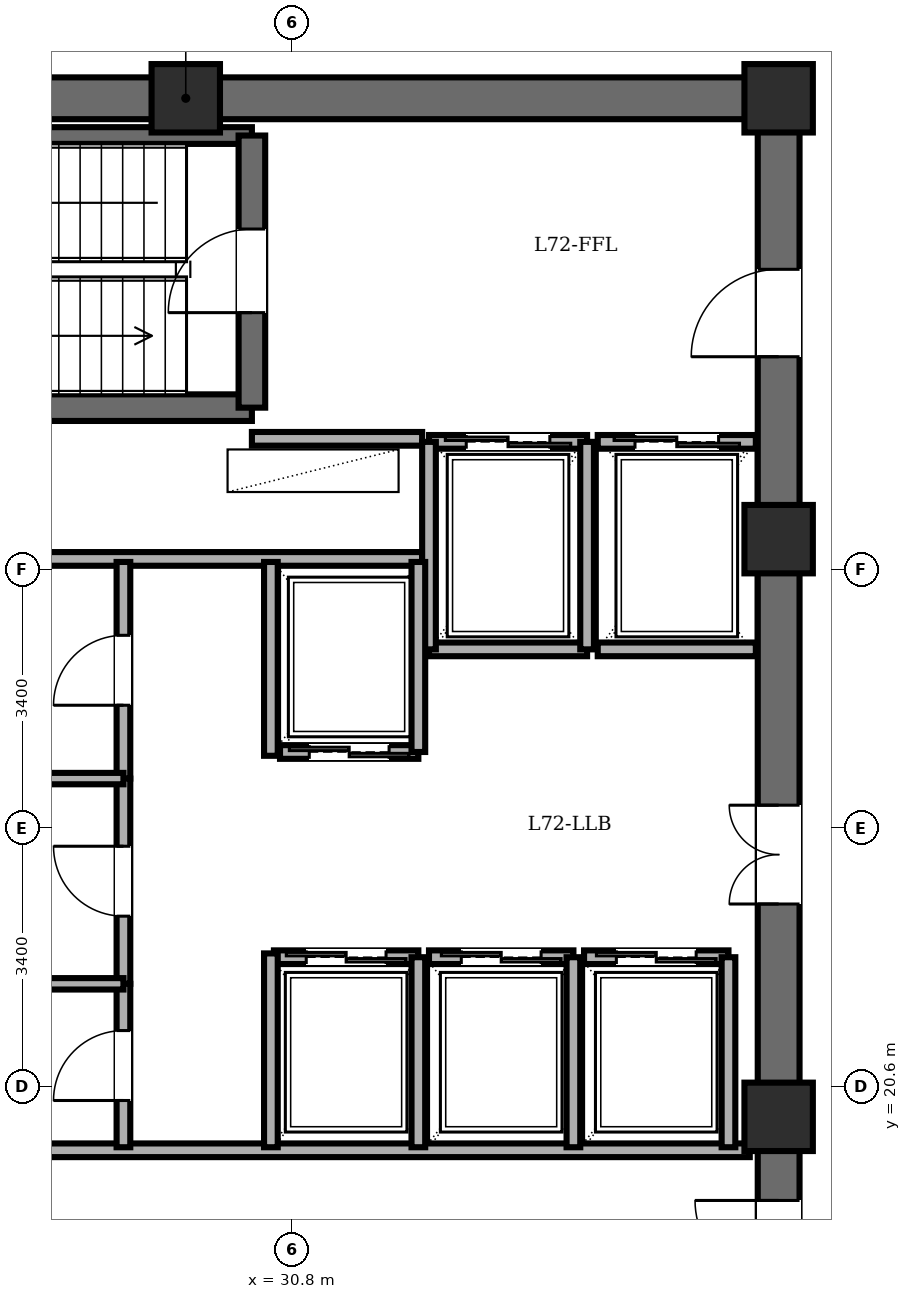
"""IFC4 building model, lengths in metres.
Left out: names, types, materials, properties, quantities, classifications, styles, units other than length and angle.
Written with IfcOpenShell. Run it as: python <this file> out.ifc"""

import sys

from ifc_helpers import new_model, si_unit, direction, frame, frame_2d, origin, origin_2d, place, context, subcontext, project, spatial, rectangle, extrude, element, fill, save


model = new_model("IFC4")
c1 = context("Model", 3, precision=1e-05, world=origin(), true_north=direction((0.0, 1.0)))
c2 = subcontext(c1, "Body", "Model", "MODEL_VIEW")
j1 = project(units=[si_unit("LENGTHUNIT", "METRE"), si_unit("PLANEANGLEUNIT", "RADIAN")], contexts=[c1])
p1 = place(None, origin())
s1 = spatial("IfcSite", under=j1, at=p1, CompositionType="ELEMENT")
p2 = place(p1, origin())
s2 = spatial("IfcBuilding", under=s1, at=p2, CompositionType="ELEMENT")
p3 = place(p2, frame((0.0, 0.0, 277.05)))
s3 = spatial("IfcBuildingStorey", under=s2, at=p3, CompositionType="ELEMENT", Elevation=277.05)
for number, where, z_axis, x_axis in (
    (1, (37.2, 20.2, 0.0), (0.0, 0.0, 1.0), (1.0, 0.0, 0.0)),
    (2, (37.2, 27.8, 0.0), (0.0, 0.0, 1.0), (1.0, 0.0, 0.0)),
    (3, (37.2, 33.6, 0.0), (0.0, 0.0, 1.0), (1.0, 0.0, 0.0)),
    (4, (29.4, 33.6, 0.0), (0.0, 0.0, 1.0), (1.0, 0.0, 0.0)),
):
    element("IfcColumn", number, at=place(p3, frame(where, z_axis=z_axis, x_axis=x_axis)), inside=s3, PredefinedType="COLUMN", context=c2, shape_type="SweptSolid", body=[
        extrude(rectangle(XDim=0.9, YDim=0.9, at=origin_2d()), origin(), (0.0, 0.0, 1.0), 3.65),
    ])
p4 = place(p3, frame((21.6, 33.6, 0.0), z_axis=(0.0, 0.0, 1.0), x_axis=(1.0, 0.0, 0.0)))
e5 = element("IfcWall", 5, at=p4, inside=s3, PredefinedType="SHEAR", context=c2, shape_type="SweptSolid", body=[
    extrude(rectangle(XDim=15.6, YDim=0.55, at=frame_2d((7.8, 0.0))), origin(), (0.0, 0.0, 1.0), 3.45),
])
p5 = place(p3, frame((37.2, 14.4, 0.0), z_axis=(0.0, 0.0, 1.0), x_axis=(0.0, 1.0, 0.0)))
e6 = element("IfcWall", 6, at=p5, inside=s3, PredefinedType="SHEAR", context=c2, shape_type="SweptSolid", body=[
    extrude(rectangle(XDim=19.2, YDim=0.55, at=frame_2d((9.6, 0.0))), origin(), (0.0, 0.0, 1.0), 3.45),
])
p6 = place(p5, frame((15.8, 0.0, 0.0)))
e7 = element("IfcOpeningElement", 7, at=p6, cuts=e6, PredefinedType="OPENING", context=c2, shape_type="SweptSolid", body=[
    extrude(rectangle(XDim=1.15, YDim=2.15, at=frame_2d((0.575, 1.075))), frame((0.0, 0.285, 0.0), z_axis=(0.0, -1.0, 0.0), x_axis=(1.0, 0.0, 0.0)), (0.0, 0.0, 1.0), 0.57),
])
p7 = place(p5, frame((3.6, 0.0, 0.0)))
e8 = element("IfcOpeningElement", 8, at=p7, cuts=e6, PredefinedType="OPENING", context=c2, shape_type="SweptSolid", body=[
    extrude(rectangle(XDim=1.1, YDim=2.15, at=frame_2d((0.55, 1.075))), frame((0.0, 0.285, 0.0), z_axis=(0.0, -1.0, 0.0), x_axis=(1.0, 0.0, 0.0)), (0.0, 0.0, 1.0), 0.57),
])
p8 = place(p5, frame((8.6, 0.0, 0.0)))
e9 = element("IfcOpeningElement", 9, at=p8, cuts=e6, PredefinedType="OPENING", context=c2, shape_type="SweptSolid", body=[
    extrude(rectangle(XDim=1.3, YDim=2.2, at=frame_2d((0.65, 1.1))), frame((0.0, 0.285, 0.0), z_axis=(0.0, -1.0, 0.0), x_axis=(1.0, 0.0, 0.0)), (0.0, 0.0, 1.0), 0.57),
])
p9 = place(p3, frame((22.48, 29.53, 0.0), z_axis=(0.0, 0.0, 1.0), x_axis=(1.0, 0.0, 0.0)))
e10 = element("IfcWall", 10, at=p9, inside=s3, PredefinedType="SOLIDWALL", context=c2, shape_type="SweptSolid", body=[
    extrude(rectangle(XDim=7.79, YDim=0.35, at=frame_2d((3.895, 0.0))), origin(), (0.0, 0.0, 1.0), 3.45),
])
p10 = place(p3, frame((22.48, 33.11, 0.0), z_axis=(0.0, 0.0, 1.0), x_axis=(1.0, 0.0, 0.0)))
e11 = element("IfcWall", 11, at=p10, inside=s3, PredefinedType="PARTITIONING", context=c2, shape_type="SweptSolid", body=[
    extrude(rectangle(XDim=7.79, YDim=0.22, at=frame_2d((3.895, 0.0))), origin(), (0.0, 0.0, 1.0), 3.45),
])
p11 = place(p3, frame((30.27, 29.53, 0.0), z_axis=(0.0, 0.0, 1.0), x_axis=(0.0, 1.0, 0.0)))
e12 = element("IfcWall", 12, at=p11, inside=s3, PredefinedType="SOLIDWALL", context=c2, shape_type="SweptSolid", body=[
    extrude(rectangle(XDim=3.58, YDim=0.35, at=frame_2d((1.79, 0.0))), origin(), (0.0, 0.0, 1.0), 3.45),
])
p12 = place(p11, frame((1.25, 0.0, 0.0)))
e13 = element("IfcOpeningElement", 13, at=p12, cuts=e12, PredefinedType="OPENING", context=c2, shape_type="SweptSolid", body=[
    extrude(rectangle(XDim=1.1, YDim=2.15, at=frame_2d((0.55, 1.075))), frame((0.0, 0.185, 0.0), z_axis=(0.0, -1.0, 0.0), x_axis=(1.0, 0.0, 0.0)), (0.0, 0.0, 1.0), 0.37),
])
p13 = place(p3, frame((30.27, 29.12, 0.0), z_axis=(0.0, 0.0, 1.0), x_axis=(1.0, 0.0, 0.0)))
e14 = element("IfcWall", 14, at=p13, inside=s3, PredefinedType="PARTITIONING", context=c2, shape_type="SweptSolid", body=[
    extrude(rectangle(XDim=2.24, YDim=0.18, at=frame_2d((1.12, 0.0))), origin(), (0.0, 0.0, 1.0), 3.45),
])
p14 = place(p3, frame((21.95, 27.54, 0.0), z_axis=(0.0, 0.0, 1.0), x_axis=(1.0, 0.0, 0.0)))
e15 = element("IfcWall", 15, at=p14, inside=s3, PredefinedType="PARTITIONING", context=c2, shape_type="SweptSolid", body=[
    extrude(rectangle(XDim=10.56, YDim=0.18, at=frame_2d((5.28, 0.0))), origin(), (0.0, 0.0, 1.0), 3.45),
])
p15 = place(p3, frame((21.95, 19.76, 0.0), z_axis=(0.0, 0.0, 1.0), x_axis=(1.0, 0.0, 0.0)))
e16 = element("IfcWall", 16, at=p15, inside=s3, PredefinedType="PARTITIONING", context=c2, shape_type="SweptSolid", body=[
    extrude(rectangle(XDim=14.87, YDim=0.18, at=frame_2d((7.435, 0.0))), origin(), (0.0, 0.0, 1.0), 3.45),
])
p16 = place(p3, frame((32.6, 29.08, 0.0), z_axis=(0.0, 0.0, 1.0), x_axis=(1.0, 0.0, 0.0)))
e17 = element("IfcWall", 17, at=p16, inside=s3, PredefinedType="PARTITIONING", context=c2, shape_type="SweptSolid", body=[
    extrude(rectangle(XDim=2.08, YDim=0.18, at=frame_2d((1.04, 0.0))), origin(), (0.0, 0.0, 1.0), 3.45),
])
p17 = place(p16, frame((0.49, 0.0, 0.0)))
e18 = element("IfcOpeningElement", 18, at=p17, cuts=e17, PredefinedType="OPENING", context=c2, shape_type="SweptSolid", body=[
    extrude(rectangle(XDim=1.1, YDim=2.2, at=frame_2d((0.55, 1.1))), frame((0.0, 0.1, 0.0), z_axis=(0.0, -1.0, 0.0), x_axis=(1.0, 0.0, 0.0)), (0.0, 0.0, 1.0), 0.2),
])
p18 = place(p3, frame((34.68, 26.35, 0.0), z_axis=(0.0, 0.0, 1.0), x_axis=(-1.0, 0.0, 0.0)))
e19 = element("IfcWall", 19, at=p18, inside=s3, PredefinedType="PARTITIONING", context=c2, shape_type="SweptSolid", body=[
    extrude(rectangle(XDim=2.08, YDim=0.18, at=frame_2d((1.04, 0.0))), origin(), (0.0, 0.0, 1.0), 3.45),
])
for number, where, z_axis, x_axis in (
    (20, (34.68, 26.35, 0.0), (0.0, 0.0, 1.0), (0.0, 1.0, 0.0)),
    (21, (32.6, 29.08, 0.0), (0.0, 0.0, 1.0), (0.0, -1.0, 0.0)),
):
    element("IfcWall", number, at=place(p3, frame(where, z_axis=z_axis, x_axis=x_axis)), inside=s3, PredefinedType="PARTITIONING", context=c2, shape_type="SweptSolid", body=[
        extrude(rectangle(XDim=2.73, YDim=0.18, at=frame_2d((1.365, 0.0))), origin(), (0.0, 0.0, 1.0), 3.45),
    ])
p19 = place(p3, frame((34.82, 29.08, 0.0), z_axis=(0.0, 0.0, 1.0), x_axis=(1.0, 0.0, 0.0)))
e22 = element("IfcWall", 22, at=p19, inside=s3, PredefinedType="PARTITIONING", context=c2, shape_type="SweptSolid", body=[
    extrude(rectangle(XDim=2.08, YDim=0.18, at=frame_2d((1.04, 0.0))), origin(), (0.0, 0.0, 1.0), 3.45),
])
p20 = place(p19, frame((0.49, 0.0, 0.0)))
e23 = element("IfcOpeningElement", 23, at=p20, cuts=e22, PredefinedType="OPENING", context=c2, shape_type="SweptSolid", body=[
    extrude(rectangle(XDim=1.1, YDim=2.2, at=frame_2d((0.55, 1.1))), frame((0.0, 0.1, 0.0), z_axis=(0.0, -1.0, 0.0), x_axis=(1.0, 0.0, 0.0)), (0.0, 0.0, 1.0), 0.2),
])
p21 = place(p3, frame((36.9, 26.35, 0.0), z_axis=(0.0, 0.0, 1.0), x_axis=(-1.0, 0.0, 0.0)))
e24 = element("IfcWall", 24, at=p21, inside=s3, PredefinedType="PARTITIONING", context=c2, shape_type="SweptSolid", body=[
    extrude(rectangle(XDim=2.08, YDim=0.18, at=frame_2d((1.04, 0.0))), origin(), (0.0, 0.0, 1.0), 3.45),
])
p22 = place(p3, frame((32.46, 25.0, 0.0), z_axis=(0.0, 0.0, 1.0), x_axis=(-1.0, 0.0, 0.0)))
e25 = element("IfcWall", 25, at=p22, inside=s3, PredefinedType="PARTITIONING", context=c2, shape_type="SweptSolid", body=[
    extrude(rectangle(XDim=1.82, YDim=0.18, at=frame_2d((0.91, 0.0))), origin(), (0.0, 0.0, 1.0), 3.45),
])
p23 = place(p22, frame((0.385, 0.0, 0.0)))
e26 = element("IfcOpeningElement", 26, at=p23, cuts=e25, PredefinedType="OPENING", context=c2, shape_type="SweptSolid", body=[
    extrude(rectangle(XDim=1.05, YDim=2.2, at=frame_2d((0.525, 1.1))), frame((0.0, 0.1, 0.0), z_axis=(0.0, -1.0, 0.0), x_axis=(1.0, 0.0, 0.0)), (0.0, 0.0, 1.0), 0.2),
])
p24 = place(p3, frame((32.46, 25.0, 0.0), z_axis=(0.0, 0.0, 1.0), x_axis=(0.0, 1.0, 0.0)))
e27 = element("IfcWall", 27, at=p24, inside=s3, PredefinedType="PARTITIONING", context=c2, shape_type="SweptSolid", body=[
    extrude(rectangle(XDim=2.5, YDim=0.18, at=frame_2d((1.25, 0.0))), origin(), (0.0, 0.0, 1.0), 3.45),
])
p25 = place(p3, frame((30.56, 22.3, 0.0), z_axis=(0.0, 0.0, 1.0), x_axis=(1.0, 0.0, 0.0)))
e28 = element("IfcWall", 28, at=p25, inside=s3, PredefinedType="PARTITIONING", context=c2, shape_type="SweptSolid", body=[
    extrude(rectangle(XDim=1.9, YDim=0.18, at=frame_2d((0.95, 0.0))), origin(), (0.0, 0.0, 1.0), 3.45),
])
p26 = place(p25, frame((0.425, 0.0, 0.0)))
e29 = element("IfcOpeningElement", 29, at=p26, cuts=e28, PredefinedType="OPENING", context=c2, shape_type="SweptSolid", body=[
    extrude(rectangle(XDim=1.05, YDim=2.2, at=frame_2d((0.525, 1.1))), frame((0.0, 0.1, 0.0), z_axis=(0.0, -1.0, 0.0), x_axis=(1.0, 0.0, 0.0)), (0.0, 0.0, 1.0), 0.2),
])
p27 = place(p3, frame((32.46, 19.8, 0.0), z_axis=(0.0, 0.0, 1.0), x_axis=(0.0, 1.0, 0.0)))
e30 = element("IfcWall", 30, at=p27, inside=s3, PredefinedType="PARTITIONING", context=c2, shape_type="SweptSolid", body=[
    extrude(rectangle(XDim=2.5, YDim=0.18, at=frame_2d((1.25, 0.0))), origin(), (0.0, 0.0, 1.0), 3.45),
])
p28 = place(p3, frame((32.6, 22.3, 0.0), z_axis=(0.0, 0.0, 1.0), x_axis=(1.0, 0.0, 0.0)))
e31 = element("IfcWall", 31, at=p28, inside=s3, PredefinedType="PARTITIONING", context=c2, shape_type="SweptSolid", body=[
    extrude(rectangle(XDim=1.9, YDim=0.18, at=frame_2d((0.95, 0.0))), origin(), (0.0, 0.0, 1.0), 3.45),
])
p29 = place(p28, frame((0.425, 0.0, 0.0)))
e32 = element("IfcOpeningElement", 32, at=p29, cuts=e31, PredefinedType="OPENING", context=c2, shape_type="SweptSolid", body=[
    extrude(rectangle(XDim=1.05, YDim=2.2, at=frame_2d((0.525, 1.1))), frame((0.0, 0.1, 0.0), z_axis=(0.0, -1.0, 0.0), x_axis=(1.0, 0.0, 0.0)), (0.0, 0.0, 1.0), 0.2),
])
p30 = place(p3, frame((34.5, 19.8, 0.0), z_axis=(0.0, 0.0, 1.0), x_axis=(0.0, 1.0, 0.0)))
e33 = element("IfcWall", 33, at=p30, inside=s3, PredefinedType="PARTITIONING", context=c2, shape_type="SweptSolid", body=[
    extrude(rectangle(XDim=2.5, YDim=0.18, at=frame_2d((1.25, 0.0))), origin(), (0.0, 0.0, 1.0), 3.45),
])
p31 = place(p3, frame((34.64, 22.3, 0.0), z_axis=(0.0, 0.0, 1.0), x_axis=(1.0, 0.0, 0.0)))
e34 = element("IfcWall", 34, at=p31, inside=s3, PredefinedType="PARTITIONING", context=c2, shape_type="SweptSolid", body=[
    extrude(rectangle(XDim=1.9, YDim=0.18, at=frame_2d((0.95, 0.0))), origin(), (0.0, 0.0, 1.0), 3.45),
])
p32 = place(p31, frame((0.425, 0.0, 0.0)))
e35 = element("IfcOpeningElement", 35, at=p32, cuts=e34, PredefinedType="OPENING", context=c2, shape_type="SweptSolid", body=[
    extrude(rectangle(XDim=1.05, YDim=2.2, at=frame_2d((0.525, 1.1))), frame((0.0, 0.1, 0.0), z_axis=(0.0, -1.0, 0.0), x_axis=(1.0, 0.0, 0.0)), (0.0, 0.0, 1.0), 0.2),
])
p33 = place(p3, frame((36.54, 19.8, 0.0), z_axis=(0.0, 0.0, 1.0), x_axis=(0.0, 1.0, 0.0)))
e36 = element("IfcWall", 36, at=p33, inside=s3, PredefinedType="PARTITIONING", context=c2, shape_type="SweptSolid", body=[
    extrude(rectangle(XDim=2.5, YDim=0.18, at=frame_2d((1.25, 0.0))), origin(), (0.0, 0.0, 1.0), 3.45),
])
for number, where, z_axis, x_axis in (
    (37, (30.52, 24.95, 0.0), (0.0, 0.0, 1.0), (0.0, 1.0, 0.0)),
    (38, (30.52, 19.8, 0.0), (0.0, 0.0, 1.0), (0.0, 1.0, 0.0)),
):
    element("IfcWall", number, at=place(p3, frame(where, z_axis=z_axis, x_axis=x_axis)), inside=s3, PredefinedType="PARTITIONING", context=c2, shape_type="SweptSolid", body=[
        extrude(rectangle(XDim=2.55, YDim=0.18, at=frame_2d((1.275, 0.0))), origin(), (0.0, 0.0, 1.0), 3.45),
    ])
p34 = place(p3, frame((28.58, 24.65, 0.0), z_axis=(0.0, 0.0, 1.0), x_axis=(0.0, 1.0, 0.0)))
e39 = element("IfcWall", 39, at=p34, inside=s3, PredefinedType="PARTITIONING", context=c2, shape_type="SweptSolid", body=[
    extrude(rectangle(XDim=2.85, YDim=0.18, at=frame_2d((1.425, 0.0))), origin(), (0.0, 0.0, 1.0), 3.45),
])
p35 = place(p34, frame((0.965, 0.0, 0.0)))
e40 = element("IfcOpeningElement", 40, at=p35, cuts=e39, PredefinedType="OPENING", context=c2, shape_type="SweptSolid", body=[
    extrude(rectangle(XDim=0.92, YDim=2.1, at=frame_2d((0.46, 1.05))), frame((0.0, 0.1, 0.0), z_axis=(0.0, -1.0, 0.0), x_axis=(1.0, 0.0, 0.0)), (0.0, 0.0, 1.0), 0.2),
])
p36 = place(p3, frame((28.58, 21.95, 0.0), z_axis=(0.0, 0.0, 1.0), x_axis=(0.0, 1.0, 0.0)))
e41 = element("IfcWall", 41, at=p36, inside=s3, PredefinedType="PARTITIONING", context=c2, shape_type="SweptSolid", body=[
    extrude(rectangle(XDim=2.7, YDim=0.18, at=frame_2d((1.35, 0.0))), origin(), (0.0, 0.0, 1.0), 3.45),
])
p37 = place(p36, frame((0.89, 0.0, 0.0)))
e42 = element("IfcOpeningElement", 42, at=p37, cuts=e41, PredefinedType="OPENING", context=c2, shape_type="SweptSolid", body=[
    extrude(rectangle(XDim=0.92, YDim=2.1, at=frame_2d((0.46, 1.05))), frame((0.0, 0.1, 0.0), z_axis=(0.0, -1.0, 0.0), x_axis=(1.0, 0.0, 0.0)), (0.0, 0.0, 1.0), 0.2),
])
p38 = place(p3, frame((28.58, 19.8, 0.0), z_axis=(0.0, 0.0, 1.0), x_axis=(0.0, 1.0, 0.0)))
e43 = element("IfcWall", 43, at=p38, inside=s3, PredefinedType="PARTITIONING", context=c2, shape_type="SweptSolid", body=[
    extrude(rectangle(XDim=2.15, YDim=0.18, at=frame_2d((1.075, 0.0))), origin(), (0.0, 0.0, 1.0), 3.45),
])
p39 = place(p38, frame((0.615, 0.0, 0.0)))
e44 = element("IfcOpeningElement", 44, at=p39, cuts=e43, PredefinedType="OPENING", context=c2, shape_type="SweptSolid", body=[
    extrude(rectangle(XDim=0.92, YDim=2.1, at=frame_2d((0.46, 1.05))), frame((0.0, 0.1, 0.0), z_axis=(0.0, -1.0, 0.0), x_axis=(1.0, 0.0, 0.0)), (0.0, 0.0, 1.0), 0.2),
])
for number, where, z_axis, x_axis in (
    (45, (21.95, 24.65, 0.0), (0.0, 0.0, 1.0), (1.0, 0.0, 0.0)),
    (46, (21.95, 21.95, 0.0), (0.0, 0.0, 1.0), (1.0, 0.0, 0.0)),
):
    element("IfcWall", number, at=place(p3, frame(where, z_axis=z_axis, x_axis=x_axis)), inside=s3, PredefinedType="PARTITIONING", context=c2, shape_type="SweptSolid", body=[
        extrude(rectangle(XDim=6.63, YDim=0.15, at=frame_2d((3.315, 0.0))), origin(), (0.0, 0.0, 1.0), 3.45),
    ])
p40 = place(p12, origin())
e47 = element("IfcDoor", 47, at=p40, inside=s3, OperationType="SINGLE_SWING_LEFT", PredefinedType="DOOR", context=c2, shape_type="SweptSolid", body=[
    extrude(rectangle(XDim=1.1, YDim=2.15, at=frame_2d((0.55, 1.075))), frame((0.0, 0.025, 0.0), z_axis=(0.0, -1.0, 0.0), x_axis=(1.0, 0.0, 0.0)), (0.0, 0.0, 1.0), 0.05),
])
fill(e13, e47)
p41 = place(p6, origin())
e48 = element("IfcDoor", 48, at=p41, inside=s3, OperationType="SINGLE_SWING_LEFT", PredefinedType="DOOR", context=c2, shape_type="SweptSolid", body=[
    extrude(rectangle(XDim=1.15, YDim=2.15, at=frame_2d((0.575, 1.075))), frame((0.0, 0.025, 0.0), z_axis=(0.0, -1.0, 0.0), x_axis=(1.0, 0.0, 0.0)), (0.0, 0.0, 1.0), 0.05),
])
fill(e7, e48)
p42 = place(p7, origin())
e49 = element("IfcDoor", 49, at=p42, inside=s3, OperationType="SINGLE_SWING_RIGHT", PredefinedType="DOOR", context=c2, shape_type="SweptSolid", body=[
    extrude(rectangle(XDim=1.1, YDim=2.15, at=frame_2d((0.55, 1.075))), frame((0.0, 0.025, 0.0), z_axis=(0.0, -1.0, 0.0), x_axis=(1.0, 0.0, 0.0)), (0.0, 0.0, 1.0), 0.05),
])
fill(e8, e49)
p43 = place(p17, origin())
e50 = element("IfcDoor", 50, at=p43, inside=s3, OperationType="DOUBLE_DOOR_SLIDING", PredefinedType="DOOR", context=c2, shape_type="SweptSolid", body=[
    extrude(rectangle(XDim=1.1, YDim=2.2, at=frame_2d((0.55, 1.1))), frame((0.0, 0.025, 0.0), z_axis=(0.0, -1.0, 0.0), x_axis=(1.0, 0.0, 0.0)), (0.0, 0.0, 1.0), 0.05),
])
fill(e18, e50)
p44 = place(p20, origin())
e51 = element("IfcDoor", 51, at=p44, inside=s3, OperationType="DOUBLE_DOOR_SLIDING", PredefinedType="DOOR", context=c2, shape_type="SweptSolid", body=[
    extrude(rectangle(XDim=1.1, YDim=2.2, at=frame_2d((0.55, 1.1))), frame((0.0, 0.025, 0.0), z_axis=(0.0, -1.0, 0.0), x_axis=(1.0, 0.0, 0.0)), (0.0, 0.0, 1.0), 0.05),
])
fill(e23, e51)
p45 = place(p23, origin())
e52 = element("IfcDoor", 52, at=p45, inside=s3, OperationType="DOUBLE_DOOR_SLIDING", PredefinedType="DOOR", context=c2, shape_type="SweptSolid", body=[
    extrude(rectangle(XDim=1.05, YDim=2.2, at=frame_2d((0.525, 1.1))), frame((0.0, 0.025, 0.0), z_axis=(0.0, -1.0, 0.0), x_axis=(1.0, 0.0, 0.0)), (0.0, 0.0, 1.0), 0.05),
])
fill(e26, e52)
p46 = place(p26, origin())
e53 = element("IfcDoor", 53, at=p46, inside=s3, OperationType="DOUBLE_DOOR_SLIDING", PredefinedType="DOOR", context=c2, shape_type="SweptSolid", body=[
    extrude(rectangle(XDim=1.05, YDim=2.2, at=frame_2d((0.525, 1.1))), frame((0.0, 0.025, 0.0), z_axis=(0.0, -1.0, 0.0), x_axis=(1.0, 0.0, 0.0)), (0.0, 0.0, 1.0), 0.05),
])
fill(e29, e53)
p47 = place(p29, origin())
e54 = element("IfcDoor", 54, at=p47, inside=s3, OperationType="DOUBLE_DOOR_SLIDING", PredefinedType="DOOR", context=c2, shape_type="SweptSolid", body=[
    extrude(rectangle(XDim=1.05, YDim=2.2, at=frame_2d((0.525, 1.1))), frame((0.0, 0.025, 0.0), z_axis=(0.0, -1.0, 0.0), x_axis=(1.0, 0.0, 0.0)), (0.0, 0.0, 1.0), 0.05),
])
fill(e32, e54)
p48 = place(p32, origin())
e55 = element("IfcDoor", 55, at=p48, inside=s3, OperationType="DOUBLE_DOOR_SLIDING", PredefinedType="DOOR", context=c2, shape_type="SweptSolid", body=[
    extrude(rectangle(XDim=1.05, YDim=2.2, at=frame_2d((0.525, 1.1))), frame((0.0, 0.025, 0.0), z_axis=(0.0, -1.0, 0.0), x_axis=(1.0, 0.0, 0.0)), (0.0, 0.0, 1.0), 0.05),
])
fill(e35, e55)
p49 = place(p35, origin())
e56 = element("IfcDoor", 56, at=p49, inside=s3, OperationType="SINGLE_SWING_LEFT", PredefinedType="DOOR", context=c2, shape_type="SweptSolid", body=[
    extrude(rectangle(XDim=0.92, YDim=2.1, at=frame_2d((0.46, 1.05))), frame((0.0, 0.025, 0.0), z_axis=(0.0, -1.0, 0.0), x_axis=(1.0, 0.0, 0.0)), (0.0, 0.0, 1.0), 0.05),
])
fill(e40, e56)
p50 = place(p37, origin())
e57 = element("IfcDoor", 57, at=p50, inside=s3, OperationType="SINGLE_SWING_RIGHT", PredefinedType="DOOR", context=c2, shape_type="SweptSolid", body=[
    extrude(rectangle(XDim=0.92, YDim=2.1, at=frame_2d((0.46, 1.05))), frame((0.0, 0.025, 0.0), z_axis=(0.0, -1.0, 0.0), x_axis=(1.0, 0.0, 0.0)), (0.0, 0.0, 1.0), 0.05),
])
fill(e42, e57)
p51 = place(p39, origin())
e58 = element("IfcDoor", 58, at=p51, inside=s3, OperationType="SINGLE_SWING_LEFT", PredefinedType="DOOR", context=c2, shape_type="SweptSolid", body=[
    extrude(rectangle(XDim=0.92, YDim=2.1, at=frame_2d((0.46, 1.05))), frame((0.0, 0.025, 0.0), z_axis=(0.0, -1.0, 0.0), x_axis=(1.0, 0.0, 0.0)), (0.0, 0.0, 1.0), 0.05),
])
fill(e44, e58)
p52 = place(p8, origin())
e59 = element("IfcDoor", 59, at=p52, inside=s3, OperationType="DOUBLE_DOOR_SINGLE_SWING", PredefinedType="DOOR", context=c2, shape_type="SweptSolid", body=[
    extrude(rectangle(XDim=1.3, YDim=2.2, at=frame_2d((0.65, 1.1))), frame((0.0, 0.025, 0.0), z_axis=(0.0, -1.0, 0.0), x_axis=(1.0, 0.0, 0.0)), (0.0, 0.0, 1.0), 0.05),
])
fill(e9, e59)
save(model, sys.argv[1])
